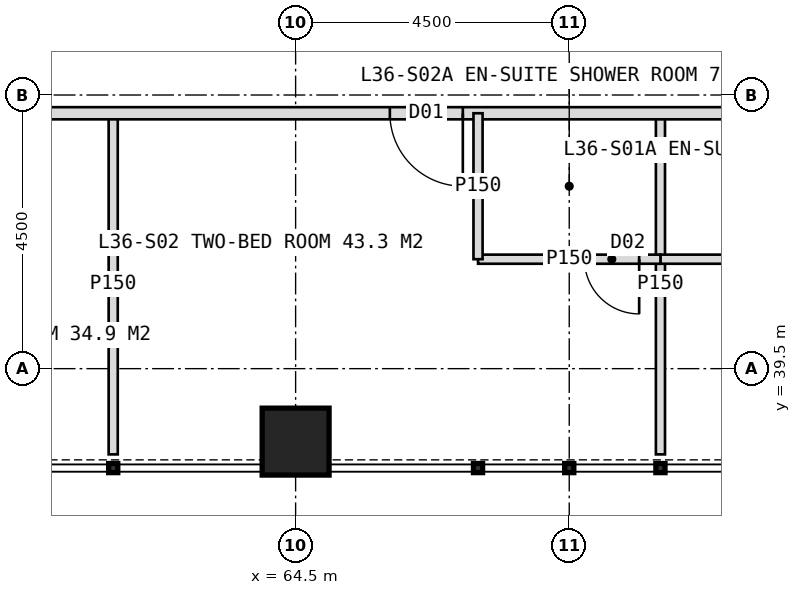
"""IFC4 building model, lengths in metres.
Left out: names, types, materials, properties, quantities, classifications, styles, units other than length and angle.
Written with IfcOpenShell. Run it as: python <this file> out.ifc"""

import sys

from ifc_helpers import new_model, si_unit, direction, frame, frame_2d, origin, origin_2d, place, context, subcontext, project, spatial, rectangle, hollow_rectangle, extrude, element, fill, save


model = new_model("IFC4")
c1 = context("Model", 3, precision=1e-05, world=origin(), true_north=direction((0.0, 1.0)))
c2 = subcontext(c1, "Body", "Model", "MODEL_VIEW")
j1 = project(units=[si_unit("LENGTHUNIT", "METRE"), si_unit("PLANEANGLEUNIT", "RADIAN")], contexts=[c1])
p1 = place(None, origin())
s1 = spatial("IfcSite", under=j1, at=p1, CompositionType="ELEMENT")
p2 = place(p1, origin())
s2 = spatial("IfcBuilding", under=s1, at=p2, CompositionType="ELEMENT")
p3 = place(p2, frame((0.0, 0.0, 152.0)))
s3 = spatial("IfcBuildingStorey", under=s2, at=p3, CompositionType="ELEMENT", Elevation=152.0)
p4 = place(p3, frame((64.5, 38.3, 0.0), z_axis=(0.0, 0.0, 1.0), x_axis=(1.0, 0.0, 0.0)))
e1 = element("IfcColumn", 1, at=p4, inside=s3, PredefinedType="COLUMN", context=c2, shape_type="SweptSolid", body=[
    extrude(hollow_rectangle(XDim=1.1, YDim=1.1, WallThickness=0.1, at=origin_2d()), origin(), (0.0, 0.0, 1.0), 4.0),
])
for number, where, z_axis, x_axis in (
    (2, (70.5, 43.7, 0.0), (0.0, 0.0, 1.0), (0.0, -1.0, 0.0)),
    (3, (61.5, 43.7, 0.0), (0.0, 0.0, 1.0), (0.0, -1.0, 0.0)),
):
    element("IfcWall", number, at=place(p3, frame(where, z_axis=z_axis, x_axis=x_axis)), inside=s3, PredefinedType="PARTITIONING", context=c2, shape_type="SweptSolid", body=[
        extrude(rectangle(XDim=5.61, YDim=0.15, at=frame_2d((2.805, 0.0))), origin(), (0.0, 0.0, 1.0), 3.75),
    ])
p5 = place(p3, frame((78.3, 43.7, 0.0), z_axis=(0.0, 0.0, 1.0), x_axis=(-1.0, 0.0, 0.0)))
e4 = element("IfcWall", 4, at=p5, inside=s3, PredefinedType="PARTITIONING", context=c2, shape_type="SweptSolid", body=[
    extrude(rectangle(XDim=36.6, YDim=0.2, at=frame_2d((18.3, 0.0))), origin(), (0.0, 0.0, 1.0), 3.75),
])
p6 = place(p5, frame((3.35, 0.0, 0.0)))
e5 = element("IfcOpeningElement", 5, at=p6, cuts=e4, PredefinedType="OPENING", context=c2, shape_type="SweptSolid", body=[
    extrude(rectangle(XDim=1.2, YDim=2.2, at=frame_2d((0.6, 1.1))), frame((0.0, 0.11, 0.0), z_axis=(0.0, -1.0, 0.0), x_axis=(1.0, 0.0, 0.0)), (0.0, 0.0, 1.0), 0.22),
])
p7 = place(p5, frame((11.05, 0.0, 0.0)))
e6 = element("IfcOpeningElement", 6, at=p7, cuts=e4, PredefinedType="OPENING", context=c2, shape_type="SweptSolid", body=[
    extrude(rectangle(XDim=1.2, YDim=2.2, at=frame_2d((0.6, 1.1))), frame((0.0, 0.11, 0.0), z_axis=(0.0, -1.0, 0.0), x_axis=(1.0, 0.0, 0.0)), (0.0, 0.0, 1.0), 0.22),
])
p8 = place(p5, frame((19.85, 0.0, 0.0)))
e7 = element("IfcOpeningElement", 7, at=p8, cuts=e4, PredefinedType="OPENING", context=c2, shape_type="SweptSolid", body=[
    extrude(rectangle(XDim=1.2, YDim=2.2, at=frame_2d((0.6, 1.1))), frame((0.0, 0.11, 0.0), z_axis=(0.0, -1.0, 0.0), x_axis=(1.0, 0.0, 0.0)), (0.0, 0.0, 1.0), 0.22),
])
p9 = place(p5, frame((26.95, 0.0, 0.0)))
e8 = element("IfcOpeningElement", 8, at=p9, cuts=e4, PredefinedType="OPENING", context=c2, shape_type="SweptSolid", body=[
    extrude(rectangle(XDim=1.2, YDim=2.2, at=frame_2d((0.6, 1.1))), frame((0.0, 0.11, 0.0), z_axis=(0.0, -1.0, 0.0), x_axis=(1.0, 0.0, 0.0)), (0.0, 0.0, 1.0), 0.22),
])
p10 = place(p3, frame((73.5, 41.3, 0.0), z_axis=(0.0, 0.0, 1.0), x_axis=(-1.0, 0.0, 0.0)))
e9 = element("IfcWall", 9, at=p10, inside=s3, PredefinedType="PARTITIONING", context=c2, shape_type="SweptSolid", body=[
    extrude(rectangle(XDim=3.0, YDim=0.15, at=frame_2d((1.5, 0.0))), origin(), (0.0, 0.0, 1.0), 3.75),
])
p11 = place(p10, frame((0.35, 0.0, 0.0)))
e10 = element("IfcOpeningElement", 10, at=p11, cuts=e9, PredefinedType="OPENING", context=c2, shape_type="SweptSolid", body=[
    extrude(rectangle(XDim=0.9, YDim=2.1, at=frame_2d((0.45, 1.05))), frame((0.0, 0.085, 0.0), z_axis=(0.0, -1.0, 0.0), x_axis=(1.0, 0.0, 0.0)), (0.0, 0.0, 1.0), 0.17),
])
p12 = place(p3, frame((70.5, 41.3, 0.0), z_axis=(0.0, 0.0, 1.0), x_axis=(-1.0, 0.0, 0.0)))
e11 = element("IfcWall", 11, at=p12, inside=s3, PredefinedType="PARTITIONING", context=c2, shape_type="SweptSolid", body=[
    extrude(rectangle(XDim=3.0, YDim=0.15, at=frame_2d((1.5, 0.0))), origin(), (0.0, 0.0, 1.0), 3.75),
])
p13 = place(p12, frame((0.35, 0.0, 0.0)))
e12 = element("IfcOpeningElement", 12, at=p13, cuts=e11, PredefinedType="OPENING", context=c2, shape_type="SweptSolid", body=[
    extrude(rectangle(XDim=0.9, YDim=2.1, at=frame_2d((0.45, 1.05))), frame((0.0, 0.085, 0.0), z_axis=(0.0, -1.0, 0.0), x_axis=(1.0, 0.0, 0.0)), (0.0, 0.0, 1.0), 0.17),
])
p14 = place(p3, frame((67.5, 43.7, 0.0), z_axis=(0.0, 0.0, 1.0), x_axis=(0.0, -1.0, 0.0)))
e13 = element("IfcWall", 13, at=p14, inside=s3, PredefinedType="PARTITIONING", context=c2, shape_type="SweptSolid", body=[
    extrude(rectangle(XDim=2.4, YDim=0.15, at=frame_2d((1.2, 0.0))), origin(), (0.0, 0.0, 1.0), 3.75),
])
p15 = place(p7, origin())
e14 = element("IfcDoor", 14, at=p15, inside=s3, OperationType="SINGLE_SWING_LEFT", PredefinedType="DOOR", context=c2, shape_type="SweptSolid", body=[
    extrude(rectangle(XDim=1.2, YDim=2.2, at=frame_2d((0.6, 1.1))), frame((0.0, 0.025, 0.0), z_axis=(0.0, -1.0, 0.0), x_axis=(1.0, 0.0, 0.0)), (0.0, 0.0, 1.0), 0.05),
])
fill(e6, e14)
p16 = place(p13, origin())
e15 = element("IfcDoor", 15, at=p16, inside=s3, OperationType="SINGLE_SWING_LEFT", PredefinedType="DOOR", context=c2, shape_type="SweptSolid", body=[
    extrude(rectangle(XDim=0.9, YDim=2.1, at=frame_2d((0.45, 1.05))), frame((0.0, 0.025, 0.0), z_axis=(0.0, -1.0, 0.0), x_axis=(1.0, 0.0, 0.0)), (0.0, 0.0, 1.0), 0.05),
])
fill(e12, e15)
save(model, sys.argv[1])
